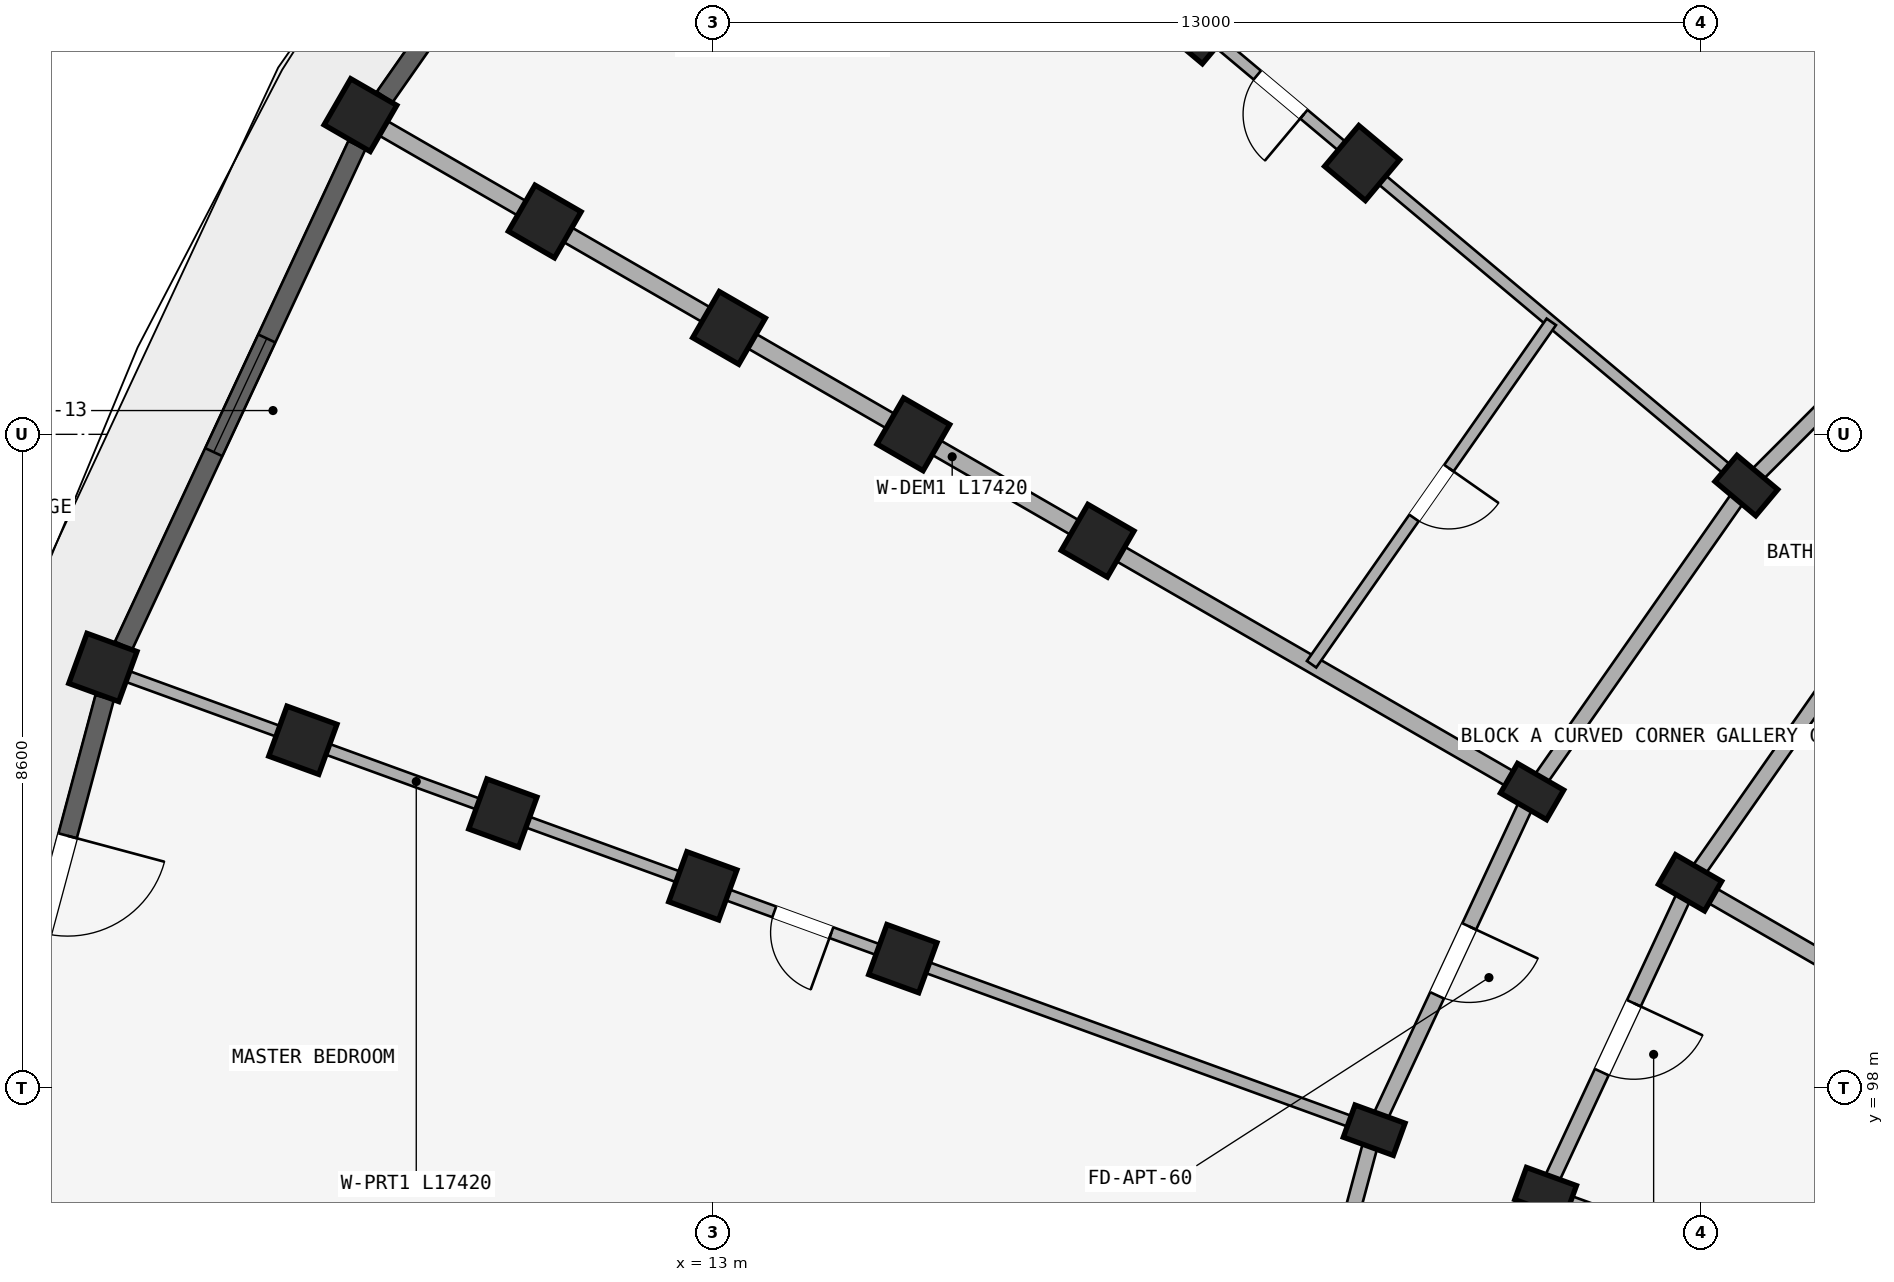
"""IFC4 building model, lengths in metres.
Left out: names, types, materials, properties, quantities, classifications, styles, units other than length and angle.
Written with IfcOpenShell. Run it as: python <this file> out.ifc"""

import sys

from ifc_helpers import new_model, si_unit, direction, frame, frame_2d, origin, origin_2d, place, context, subcontext, project, spatial, rectangle, extrude, element, fill, save


model = new_model("IFC4")
c1 = context("Model", 3, precision=1e-05, world=origin(), true_north=direction((0.0, 1.0)))
c2 = subcontext(c1, "Body", "Model", "MODEL_VIEW")
j1 = project(units=[si_unit("LENGTHUNIT", "METRE"), si_unit("PLANEANGLEUNIT", "RADIAN")], contexts=[c1])
p1 = place(None, origin())
s1 = spatial("IfcSite", under=j1, at=p1, CompositionType="ELEMENT")
p2 = place(p1, origin())
s2 = spatial("IfcBuilding", under=s1, at=p2, CompositionType="ELEMENT")
p3 = place(p2, frame((0.0, 0.0, 24.45)))
s3 = spatial("IfcBuildingStorey", under=s2, at=p3, CompositionType="ELEMENT", Elevation=24.45)
p4 = place(p3, frame((26.598, 105.927, 0.0), z_axis=(0.0, 0.0, 1.0), x_axis=(0.642787609687, 0.766044443119, 0.0)))
e1 = element("IfcColumn", 1, at=p4, inside=s3, PredefinedType="COLUMN", context=c2, shape_type="SweptSolid", body=[
    extrude(rectangle(XDim=0.45, YDim=0.7, at=origin_2d()), origin(), (0.0, 0.0, 1.0), 2.93),
])
for number, where, z_axis, x_axis in (
    (2, (21.542, 110.169, 0.0), (0.0, 0.0, 1.0), (0.643, 0.766, 0.0)),
    (3, (19.397, 111.969, 0.0), (0.0, 0.0, 1.0), (0.643, 0.766, 0.0)),
):
    element("IfcColumn", number, at=place(p3, frame(where, z_axis=z_axis, x_axis=x_axis)), inside=s3, PredefinedType="COLUMN", context=c2, shape_type="SweptSolid", body=[
        extrude(rectangle(XDim=0.7, YDim=0.7, at=origin_2d()), origin(), (0.0, 0.0, 1.0), 2.93),
    ])
for number, where, z_axis, x_axis in (
    (4, (25.856, 100.7, 0.0), (0.0, 0.0, 1.0), (0.5, 0.866, 0.0)),
    (5, (23.778, 101.9, 0.0), (0.0, 0.0, 1.0), (0.5, 0.866, 0.0)),
):
    element("IfcColumn", number, at=place(p3, frame(where, z_axis=z_axis, x_axis=x_axis)), inside=s3, PredefinedType="COLUMN", context=c2, shape_type="SweptSolid", body=[
        extrude(rectangle(XDim=0.45, YDim=0.7, at=origin_2d()), origin(), (0.0, 0.0, 1.0), 2.93),
    ])
for number, where, z_axis, x_axis in (
    (6, (18.062, 105.2, 0.0), (0.0, 0.0, 1.0), (0.5, 0.866, 0.0)),
    (7, (15.637, 106.6, 0.0), (0.0, 0.0, 1.0), (0.5, 0.866, 0.0)),
    (8, (13.213, 108.0, 0.0), (0.0, 0.0, 1.0), (0.5, 0.866, 0.0)),
    (9, (10.788, 109.4, 0.0), (0.0, 0.0, 1.0), (0.5, 0.866, 0.0)),
    (10, (8.363, 110.8, 0.0), (0.0, 0.0, 1.0), (0.5, 0.866, 0.0)),
):
    element("IfcColumn", number, at=place(p3, frame(where, z_axis=z_axis, x_axis=x_axis)), inside=s3, PredefinedType="COLUMN", context=c2, shape_type="SweptSolid", body=[
        extrude(rectangle(XDim=0.7, YDim=0.7, at=origin_2d()), origin(), (0.0, 0.0, 1.0), 2.93),
    ])
for number, where, z_axis, x_axis in (
    (11, (23.956, 96.624, 0.0), (0.0, 0.0, 1.0), (0.342, 0.94, 0.0)),
    (12, (21.701, 97.445, 0.0), (0.0, 0.0, 1.0), (0.342, 0.94, 0.0)),
):
    element("IfcColumn", number, at=place(p3, frame(where, z_axis=z_axis, x_axis=x_axis)), inside=s3, PredefinedType="COLUMN", context=c2, shape_type="SweptSolid", body=[
        extrude(rectangle(XDim=0.45, YDim=0.7, at=origin_2d()), origin(), (0.0, 0.0, 1.0), 2.93),
    ])
for number, where, z_axis, x_axis in (
    (13, (15.499, 99.702, 0.0), (0.0, 0.0, 1.0), (0.342, 0.94, 0.0)),
    (14, (12.868, 100.66, 0.0), (0.0, 0.0, 1.0), (0.342, 0.94, 0.0)),
    (15, (10.236, 101.618, 0.0), (0.0, 0.0, 1.0), (0.342, 0.94, 0.0)),
    (16, (7.605, 102.575, 0.0), (0.0, 0.0, 1.0), (0.342, 0.94, 0.0)),
    (17, (4.974, 103.533, 0.0), (0.0, 0.0, 1.0), (0.342, 0.94, 0.0)),
):
    element("IfcColumn", number, at=place(p3, frame(where, z_axis=z_axis, x_axis=x_axis)), inside=s3, PredefinedType="COLUMN", context=c2, shape_type="SweptSolid", body=[
        extrude(rectangle(XDim=0.7, YDim=0.7, at=origin_2d()), origin(), (0.0, 0.0, 1.0), 2.93),
    ])
p5 = place(p3, frame((30.073, 109.402, 0.0), z_axis=(0.0, 0.0, 1.0), x_axis=(-0.707106781187, -0.707106781187, 0.0)))
e18 = element("IfcWall", 18, at=p5, inside=s3, PredefinedType="STANDARD", context=c2, shape_type="SweptSolid", body=[
    extrude(rectangle(XDim=4.916, YDim=0.2, at=frame_2d((2.458, 0.0))), origin(), (0.0, 0.0, 1.0), 2.372),
])
p6 = place(p5, frame((1.888, 0.0, 0.0)))
e19 = element("IfcOpeningElement", 19, at=p6, cuts=e18, PredefinedType="OPENING", context=c2, shape_type="SweptSolid", body=[
    extrude(rectangle(XDim=1.14, YDim=2.15, at=frame_2d((0.57, 1.075))), frame((0.0, 0.11, 0.0), z_axis=(0.0, -1.0, 0.0), x_axis=(1.0, 0.0, 0.0)), (0.0, 0.0, 1.0), 0.22),
])
p7 = place(p3, frame((28.436, 104.384, 0.0), z_axis=(0.0, 0.0, 1.0), x_axis=(-0.573571637217, -0.819155404658, 0.0)))
e20 = element("IfcWall", 20, at=p7, inside=s3, PredefinedType="STANDARD", context=c2, shape_type="SweptSolid", body=[
    extrude(rectangle(XDim=4.497, YDim=0.2, at=frame_2d((2.249, 0.0))), origin(), (0.0, 0.0, 1.0), 2.372),
])
p8 = place(p3, frame((26.598, 105.927, 0.0), z_axis=(0.0, 0.0, 1.0), x_axis=(-0.573592335331, -0.819140911474, 0.0)))
e21 = element("IfcWall", 21, at=p8, inside=s3, PredefinedType="STANDARD", context=c2, shape_type="SweptSolid", body=[
    extrude(rectangle(XDim=4.916, YDim=0.2, at=frame_2d((2.458, 0.0))), origin(), (0.0, 0.0, 1.0), 2.372),
])
p9 = place(p3, frame((25.856, 100.7, 0.0), z_axis=(0.0, 0.0, 1.0), x_axis=(-0.422617978463, -0.906307919131, 0.0)))
e22 = element("IfcWall", 22, at=p9, inside=s3, PredefinedType="STANDARD", context=c2, shape_type="SweptSolid", body=[
    extrude(rectangle(XDim=4.497, YDim=0.2, at=frame_2d((2.249, 0.0))), origin(), (0.0, 0.0, 1.0), 2.372),
])
p10 = place(p9, frame((1.749, 0.0, 0.0)))
e23 = element("IfcOpeningElement", 23, at=p10, cuts=e22, PredefinedType="OPENING", context=c2, shape_type="SweptSolid", body=[
    extrude(rectangle(XDim=1.0, YDim=2.15, at=frame_2d((0.5, 1.075))), frame((0.0, 0.11, 0.0), z_axis=(0.0, -1.0, 0.0), x_axis=(1.0, 0.0, 0.0)), (0.0, 0.0, 1.0), 0.22),
])
p11 = place(p3, frame((23.778, 101.9, 0.0), z_axis=(0.0, 0.0, 1.0), x_axis=(-0.422629854778, -0.906302381024, 0.0)))
e24 = element("IfcWall", 24, at=p11, inside=s3, PredefinedType="STANDARD", context=c2, shape_type="SweptSolid", body=[
    extrude(rectangle(XDim=4.915, YDim=0.2, at=frame_2d((2.458, 0.0))), origin(), (0.0, 0.0, 1.0), 2.372),
])
p12 = place(p11, frame((1.958, 0.0, 0.0)))
e25 = element("IfcOpeningElement", 25, at=p12, cuts=e24, PredefinedType="OPENING", context=c2, shape_type="SweptSolid", body=[
    extrude(rectangle(XDim=1.0, YDim=2.15, at=frame_2d((0.5, 1.075))), frame((0.0, 0.11, 0.0), z_axis=(0.0, -1.0, 0.0), x_axis=(1.0, 0.0, 0.0)), (0.0, 0.0, 1.0), 0.22),
])
p13 = place(p3, frame((23.956, 96.624, 0.0), z_axis=(0.0, 0.0, 1.0), x_axis=(-0.258787642463, -0.965934240054, 0.0)))
e26 = element("IfcWall", 26, at=p13, inside=s3, PredefinedType="STANDARD", context=c2, shape_type="SweptSolid", body=[
    extrude(rectangle(XDim=4.497, YDim=0.2, at=frame_2d((2.249, 0.0))), origin(), (0.0, 0.0, 1.0), 2.372),
])
p14 = place(p3, frame((21.701, 97.445, 0.0), z_axis=(0.0, 0.0, 1.0), x_axis=(-0.258803112091, -0.965930095386, 0.0)))
e27 = element("IfcWall", 27, at=p14, inside=s3, PredefinedType="STANDARD", context=c2, shape_type="SweptSolid", body=[
    extrude(rectangle(XDim=4.916, YDim=0.2, at=frame_2d((2.458, 0.0))), origin(), (0.0, 0.0, 1.0), 2.372),
])
p15 = place(p3, frame((30.009, 109.479, 0.0), z_axis=(0.0, 0.0, 1.0), x_axis=(-0.642784757967, 0.766046835987, 0.0)))
e28 = element("IfcWall", 28, at=p15, inside=s3, PredefinedType="STANDARD", context=c2, shape_type="SweptSolid", body=[
    extrude(rectangle(XDim=17.42, YDim=0.22, at=frame_2d((8.71, 0.0))), origin(), (0.0, 0.0, 1.0), 2.372),
])
p16 = place(p3, frame((26.521, 105.991, 0.0), z_axis=(0.0, 0.0, 1.0), x_axis=(-0.766046835987, 0.642784757967, 0.0)))
e29 = element("IfcWall", 29, at=p16, inside=s3, PredefinedType="PARTITIONING", context=c2, shape_type="SweptSolid", body=[
    extrude(rectangle(XDim=17.42, YDim=0.15, at=frame_2d((8.71, 0.0))), origin(), (0.0, 0.0, 1.0), 2.372),
])
p17 = place(p16, frame((7.5, 0.0, 0.0)))
e30 = element("IfcOpeningElement", 30, at=p17, cuts=e29, PredefinedType="OPENING", context=c2, shape_type="SweptSolid", body=[
    extrude(rectangle(XDim=0.8, YDim=2.1, at=frame_2d((0.4, 1.05))), frame((0.0, 0.085, 0.0), z_axis=(0.0, -1.0, 0.0), x_axis=(1.0, 0.0, 0.0)), (0.0, 0.0, 1.0), 0.17),
])
p18 = place(p3, frame((31.746, 97.3, 0.0), z_axis=(0.0, 0.0, 1.0), x_axis=(-0.866026575979, 0.499997969693, 0.0)))
e31 = element("IfcWall", 31, at=p18, inside=s3, PredefinedType="STANDARD", context=c2, shape_type="SweptSolid", body=[
    extrude(rectangle(XDim=6.75, YDim=0.22, at=frame_2d((3.375, 0.0))), origin(), (0.0, 0.0, 1.0), 2.372),
])
p19 = place(p3, frame((23.691, 101.95, 0.0), z_axis=(0.0, 0.0, 1.0), x_axis=(-0.866026648973, 0.499997843263, 0.0)))
e32 = element("IfcWall", 32, at=p19, inside=s3, PredefinedType="STANDARD", context=c2, shape_type="SweptSolid", body=[
    extrude(rectangle(XDim=17.42, YDim=0.22, at=frame_2d((8.71, 0.0))), origin(), (0.0, 0.0, 1.0), 2.372),
])
p20 = place(p3, frame((30.346, 94.298, 0.0), z_axis=(0.0, 0.0, 1.0), x_axis=(-0.939696231917, 0.342010221662, 0.0)))
e33 = element("IfcWall", 33, at=p20, inside=s3, PredefinedType="PARTITIONING", context=c2, shape_type="SweptSolid", body=[
    extrude(rectangle(XDim=6.75, YDim=0.15, at=frame_2d((3.375, 0.0))), origin(), (0.0, 0.0, 1.0), 2.372),
])
p21 = place(p20, frame((3.262, 0.0, 0.0)))
e34 = element("IfcOpeningElement", 34, at=p21, cuts=e33, PredefinedType="OPENING", context=c2, shape_type="SweptSolid", body=[
    extrude(rectangle(XDim=0.9, YDim=2.1, at=frame_2d((0.45, 1.05))), frame((0.0, 0.085, 0.0), z_axis=(0.0, -1.0, 0.0), x_axis=(1.0, 0.0, 0.0)), (0.0, 0.0, 1.0), 0.17),
])
p22 = place(p3, frame((21.607, 97.479, 0.0), z_axis=(0.0, 0.0, 1.0), x_axis=(-0.939691901159, 0.342022120477, 0.0)))
e35 = element("IfcWall", 35, at=p22, inside=s3, PredefinedType="PARTITIONING", context=c2, shape_type="SweptSolid", body=[
    extrude(rectangle(XDim=17.42, YDim=0.15, at=frame_2d((8.71, 0.0))), origin(), (0.0, 0.0, 1.0), 2.372),
])
p23 = place(p22, frame((7.5, 0.0, 0.0)))
e36 = element("IfcOpeningElement", 36, at=p23, cuts=e35, PredefinedType="OPENING", context=c2, shape_type="SweptSolid", body=[
    extrude(rectangle(XDim=0.8, YDim=2.1, at=frame_2d((0.4, 1.05))), frame((0.0, 0.085, 0.0), z_axis=(0.0, -1.0, 0.0), x_axis=(1.0, 0.0, 0.0)), (0.0, 0.0, 1.0), 0.17),
])
p24 = place(p3, frame((24.031, 108.08, 0.0), z_axis=(0.0, 0.0, 1.0), x_axis=(-0.573569599955, -0.819156831143, 0.0)))
e37 = element("IfcWall", 37, at=p24, inside=s3, PredefinedType="PLUMBINGWALL", context=c2, shape_type="SweptSolid", body=[
    extrude(rectangle(XDim=5.5, YDim=0.15, at=frame_2d((2.75, 0.0))), origin(), (0.0, 0.0, 1.0), 2.372),
])
p25 = place(p24, frame((2.35, 0.0, 0.0)))
e38 = element("IfcOpeningElement", 38, at=p25, cuts=e37, PredefinedType="OPENING", context=c2, shape_type="SweptSolid", body=[
    extrude(rectangle(XDim=0.8, YDim=2.1, at=frame_2d((0.4, 1.05))), frame((0.0, 0.085, 0.0), z_axis=(0.0, -1.0, 0.0), x_axis=(1.0, 0.0, 0.0)), (0.0, 0.0, 1.0), 0.17),
])
p26 = place(p3, frame((12.849, 116.989, 0.0), z_axis=(0.0, 0.0, 1.0), x_axis=(-0.573566061701, -0.819159308599, 0.0)))
e39 = element("IfcWall", 39, at=p26, inside=s3, PredefinedType="STANDARD", context=c2, shape_type="SweptSolid", body=[
    extrude(rectangle(XDim=7.267, YDim=0.25, at=frame_2d((3.633, 0.0))), origin(), (0.0, 0.0, 1.0), 2.372),
])
p27 = place(p26, frame((2.733, 0.0, 0.522)))
e40 = element("IfcOpeningElement", 40, at=p27, cuts=e39, PredefinedType="OPENING", context=c2, shape_type="SweptSolid", body=[
    extrude(rectangle(XDim=1.8, YDim=1.65, at=frame_2d((0.9, 0.825))), frame((0.0, 0.135, 0.0), z_axis=(0.0, -1.0, 0.0), x_axis=(1.0, 0.0, 0.0)), (0.0, 0.0, 1.0), 0.27),
])
p28 = place(p3, frame((8.317, 110.406, 0.0), z_axis=(0.0, 0.0, 1.0), x_axis=(-0.422627946127, -0.90630327107, 0.0)))
e41 = element("IfcWall", 41, at=p28, inside=s3, PredefinedType="STANDARD", context=c2, shape_type="SweptSolid", body=[
    extrude(rectangle(XDim=7.267, YDim=0.25, at=frame_2d((3.633, 0.0))), origin(), (0.0, 0.0, 1.0), 2.372),
])
p29 = place(p28, frame((2.808, 0.0, 0.422)))
e42 = element("IfcOpeningElement", 42, at=p29, cuts=e41, PredefinedType="OPENING", context=c2, shape_type="SweptSolid", body=[
    extrude(rectangle(XDim=1.65, YDim=1.75, at=frame_2d((0.825, 0.875))), frame((0.0, 0.135, 0.0), z_axis=(0.0, -1.0, 0.0), x_axis=(1.0, 0.0, 0.0)), (0.0, 0.0, 1.0), 0.27),
])
p30 = place(p3, frame((4.998, 103.137, 0.0), z_axis=(0.0, 0.0, 1.0), x_axis=(-0.258802140196, -0.965930355787, 0.0)))
e43 = element("IfcWall", 43, at=p30, inside=s3, PredefinedType="STANDARD", context=c2, shape_type="SweptSolid", body=[
    extrude(rectangle(XDim=7.267, YDim=0.25, at=frame_2d((3.633, 0.0))), origin(), (0.0, 0.0, 1.0), 2.372),
])
p31 = place(p30, frame((4.766, 0.0, 0.522)))
e44 = element("IfcOpeningElement", 44, at=p31, cuts=e43, PredefinedType="OPENING", context=c2, shape_type="SweptSolid", body=[
    extrude(rectangle(XDim=1.2, YDim=1.5, at=frame_2d((0.6, 0.75))), frame((0.0, 0.135, 0.0), z_axis=(0.0, -1.0, 0.0), x_axis=(1.0, 0.0, 0.0)), (0.0, 0.0, 1.0), 0.27),
])
p32 = place(p30, frame((1.883, 0.0, 0.0)))
e45 = element("IfcOpeningElement", 45, at=p32, cuts=e43, PredefinedType="OPENING", context=c2, shape_type="SweptSolid", body=[
    extrude(rectangle(XDim=1.32, YDim=2.15, at=frame_2d((0.66, 1.075))), frame((0.0, 0.135, 0.0), z_axis=(0.0, -1.0, 0.0), x_axis=(1.0, 0.0, 0.0)), (0.0, 0.0, 1.0), 0.27),
])
p33 = place(p29, origin())
e46 = element("IfcWindow", 46, at=p33, inside=s3, PartitioningType="DOUBLE_PANEL_VERTICAL", PredefinedType="WINDOW", context=c2, shape_type="SweptSolid", body=[
    extrude(rectangle(XDim=1.65, YDim=1.75, at=frame_2d((0.825, 0.875))), frame((0.0, 0.03, 0.0), z_axis=(0.0, -1.0, 0.0), x_axis=(1.0, 0.0, 0.0)), (0.0, 0.0, 1.0), 0.06),
])
fill(e42, e46)
p34 = place(p17, origin())
e47 = element("IfcDoor", 47, at=p34, inside=s3, OperationType="SINGLE_SWING_LEFT", PredefinedType="DOOR", context=c2, shape_type="SweptSolid", body=[
    extrude(rectangle(XDim=0.8, YDim=2.1, at=frame_2d((0.4, 1.05))), frame((0.0, 0.025, 0.0), z_axis=(0.0, -1.0, 0.0), x_axis=(1.0, 0.0, 0.0)), (0.0, 0.0, 1.0), 0.05),
])
fill(e30, e47)
p35 = place(p23, origin())
e48 = element("IfcDoor", 48, at=p35, inside=s3, OperationType="SINGLE_SWING_LEFT", PredefinedType="DOOR", context=c2, shape_type="SweptSolid", body=[
    extrude(rectangle(XDim=0.8, YDim=2.1, at=frame_2d((0.4, 1.05))), frame((0.0, 0.025, 0.0), z_axis=(0.0, -1.0, 0.0), x_axis=(1.0, 0.0, 0.0)), (0.0, 0.0, 1.0), 0.05),
])
fill(e36, e48)
p36 = place(p25, origin())
e49 = element("IfcDoor", 49, at=p36, inside=s3, OperationType="SINGLE_SWING_LEFT", PredefinedType="DOOR", context=c2, shape_type="SweptSolid", body=[
    extrude(rectangle(XDim=0.8, YDim=2.1, at=frame_2d((0.4, 1.05))), frame((0.0, 0.025, 0.0), z_axis=(0.0, -1.0, 0.0), x_axis=(1.0, 0.0, 0.0)), (0.0, 0.0, 1.0), 0.05),
])
fill(e38, e49)
p37 = place(p12, frame((1.0, 0.0, 0.0), z_axis=(0.0, 0.0, 1.0), x_axis=(-1.0, 0.0, 0.0)))
e50 = element("IfcDoor", 50, at=p37, inside=s3, OperationType="SINGLE_SWING_RIGHT", PredefinedType="DOOR", context=c2, shape_type="SweptSolid", body=[
    extrude(rectangle(XDim=1.0, YDim=2.15, at=frame_2d((0.5, 1.075))), frame((0.0, 0.025, 0.0), z_axis=(0.0, -1.0, 0.0), x_axis=(1.0, 0.0, 0.0)), (0.0, 0.0, 1.0), 0.05),
])
fill(e25, e50)
p38 = place(p10, frame((1.0, 0.0, 0.0), z_axis=(0.0, 0.0, 1.0), x_axis=(-1.0, 0.0, 0.0)))
e51 = element("IfcDoor", 51, at=p38, inside=s3, OperationType="SINGLE_SWING_RIGHT", PredefinedType="DOOR", context=c2, shape_type="SweptSolid", body=[
    extrude(rectangle(XDim=1.0, YDim=2.15, at=frame_2d((0.5, 1.075))), frame((0.0, 0.025, 0.0), z_axis=(0.0, -1.0, 0.0), x_axis=(1.0, 0.0, 0.0)), (0.0, 0.0, 1.0), 0.05),
])
fill(e23, e51)
p39 = place(p32, frame((1.32, 0.0, 0.0), z_axis=(0.0, 0.0, 1.0), x_axis=(-1.0, 0.0, 0.0)))
e52 = element("IfcDoor", 52, at=p39, inside=s3, OperationType="SINGLE_SWING_RIGHT", PredefinedType="DOOR", context=c2, shape_type="SweptSolid", body=[
    extrude(rectangle(XDim=1.32, YDim=2.15, at=frame_2d((0.66, 1.075))), frame((0.0, 0.025, 0.0), z_axis=(0.0, -1.0, 0.0), x_axis=(1.0, 0.0, 0.0)), (0.0, 0.0, 1.0), 0.05),
])
fill(e45, e52)
save(model, sys.argv[1])
